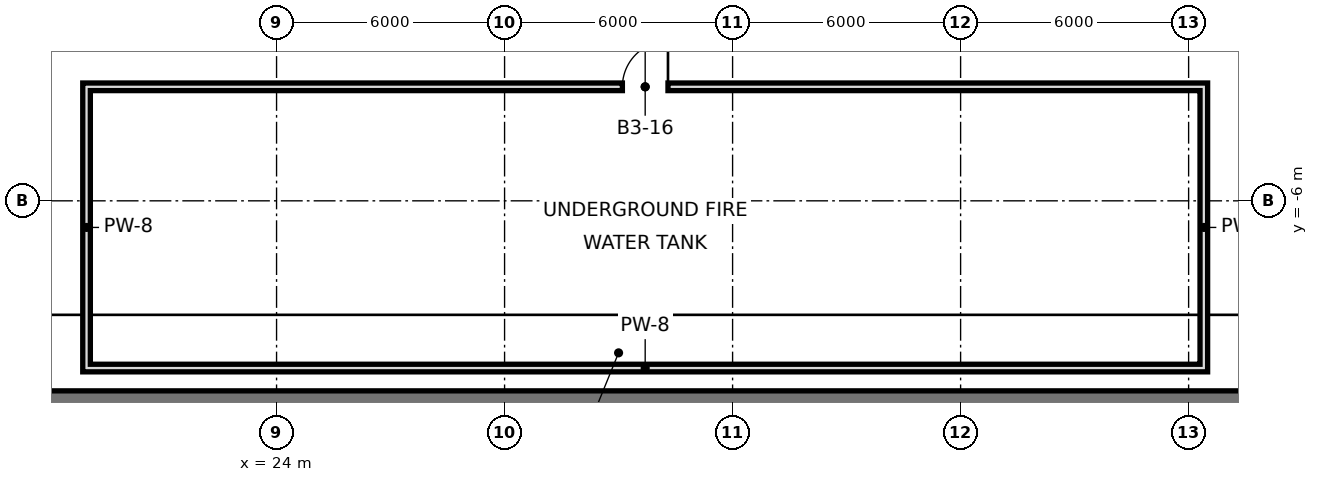
"""IFC4 building model, lengths in metres.
Left out: names, types, materials, properties, quantities, classifications, styles, units other than length and angle.
Written with IfcOpenShell. Run it as: python <this file> out.ifc"""

import sys

from ifc_helpers import new_model, si_unit, direction, frame, frame_2d, origin, place, context, subcontext, project, spatial, rectangle, extrude, element, fill, save


model = new_model("IFC4")
c1 = context("Model", 3, precision=1e-05, world=origin(), true_north=direction((0.0, 1.0)))
c2 = subcontext(c1, "Body", "Model", "MODEL_VIEW")
j1 = project(units=[si_unit("LENGTHUNIT", "METRE"), si_unit("PLANEANGLEUNIT", "RADIAN")], contexts=[c1])
p1 = place(None, origin())
s1 = spatial("IfcSite", under=j1, at=p1, CompositionType="ELEMENT")
p2 = place(p1, origin())
s2 = spatial("IfcBuilding", under=s1, at=p2, CompositionType="ELEMENT")
p3 = place(p2, frame((0.0, 0.0, -13.5)))
s3 = spatial("IfcBuildingStorey", under=s2, at=p3, CompositionType="ELEMENT", Elevation=-13.5)
p4 = place(p3, frame((-23.0, -11.5, -26.5), z_axis=(0.0, 0.0, 1.0), x_axis=(1.0, 0.0, 0.0)))
e1 = element("IfcWall", 1, at=p4, inside=s3, PredefinedType="SOLIDWALL", context=c2, shape_type="SweptSolid", body=[
    extrude(rectangle(XDim=112.0, YDim=1.0, at=frame_2d((56.0, 0.0))), origin(), (0.0, 0.0, 1.0), 39.64),
])
for number, where, z_axis, x_axis in (
    (2, (19.0, -10.5, 0.0), (0.0, 0.0, 1.0), (0.0, 1.0, 0.0)),
    (3, (48.4, -10.5, 0.0), (0.0, 0.0, 1.0), (0.0, 1.0, 0.0)),
):
    element("IfcWall", number, at=place(p3, frame(where, z_axis=z_axis, x_axis=x_axis)), inside=s3, PredefinedType="SOLIDWALL", context=c2, shape_type="SweptSolid", body=[
        extrude(rectangle(XDim=7.6, YDim=0.2, at=frame_2d((3.8, 0.0))), origin(), (0.0, 0.0, 1.0), 4.15),
    ])
p5 = place(p3, frame((19.1, -10.4, 0.0), z_axis=(0.0, 0.0, 1.0), x_axis=(1.0, 0.0, 0.0)))
e4 = element("IfcWall", 4, at=p5, inside=s3, PredefinedType="SOLIDWALL", context=c2, shape_type="SweptSolid", body=[
    extrude(rectangle(XDim=29.2, YDim=0.2, at=frame_2d((14.6, 0.0))), origin(), (0.0, 0.0, 1.0), 4.15),
])
p6 = place(p3, frame((19.1, -3.0, 0.0), z_axis=(0.0, 0.0, 1.0), x_axis=(1.0, 0.0, 0.0)))
e5 = element("IfcWall", 5, at=p6, inside=s3, PredefinedType="SOLIDWALL", context=c2, shape_type="SweptSolid", body=[
    extrude(rectangle(XDim=29.2, YDim=0.2, at=frame_2d((14.6, 0.0))), origin(), (0.0, 0.0, 1.0), 4.15),
])
p7 = place(p6, frame((14.0, 0.0, 0.0)))
e6 = element("IfcOpeningElement", 6, at=p7, cuts=e5, PredefinedType="OPENING", context=c2, shape_type="SweptSolid", body=[
    extrude(rectangle(XDim=1.2, YDim=2.4, at=frame_2d((0.6, 1.2))), frame((0.0, 0.11, 0.0), z_axis=(0.0, -1.0, 0.0), x_axis=(1.0, 0.0, 0.0)), (0.0, 0.0, 1.0), 0.22),
])
p8 = place(p7, frame((1.2, 0.0, 0.0), z_axis=(0.0, 0.0, 1.0), x_axis=(-1.0, 0.0, 0.0)))
e7 = element("IfcDoor", 7, at=p8, inside=s3, OperationType="SINGLE_SWING_LEFT", PredefinedType="DOOR", context=c2, shape_type="SweptSolid", body=[
    extrude(rectangle(XDim=1.2, YDim=2.4, at=frame_2d((0.6, 1.2))), frame((0.0, 0.025, 0.0), z_axis=(0.0, -1.0, 0.0), x_axis=(1.0, 0.0, 0.0)), (0.0, 0.0, 1.0), 0.05),
])
fill(e6, e7)
save(model, sys.argv[1])
